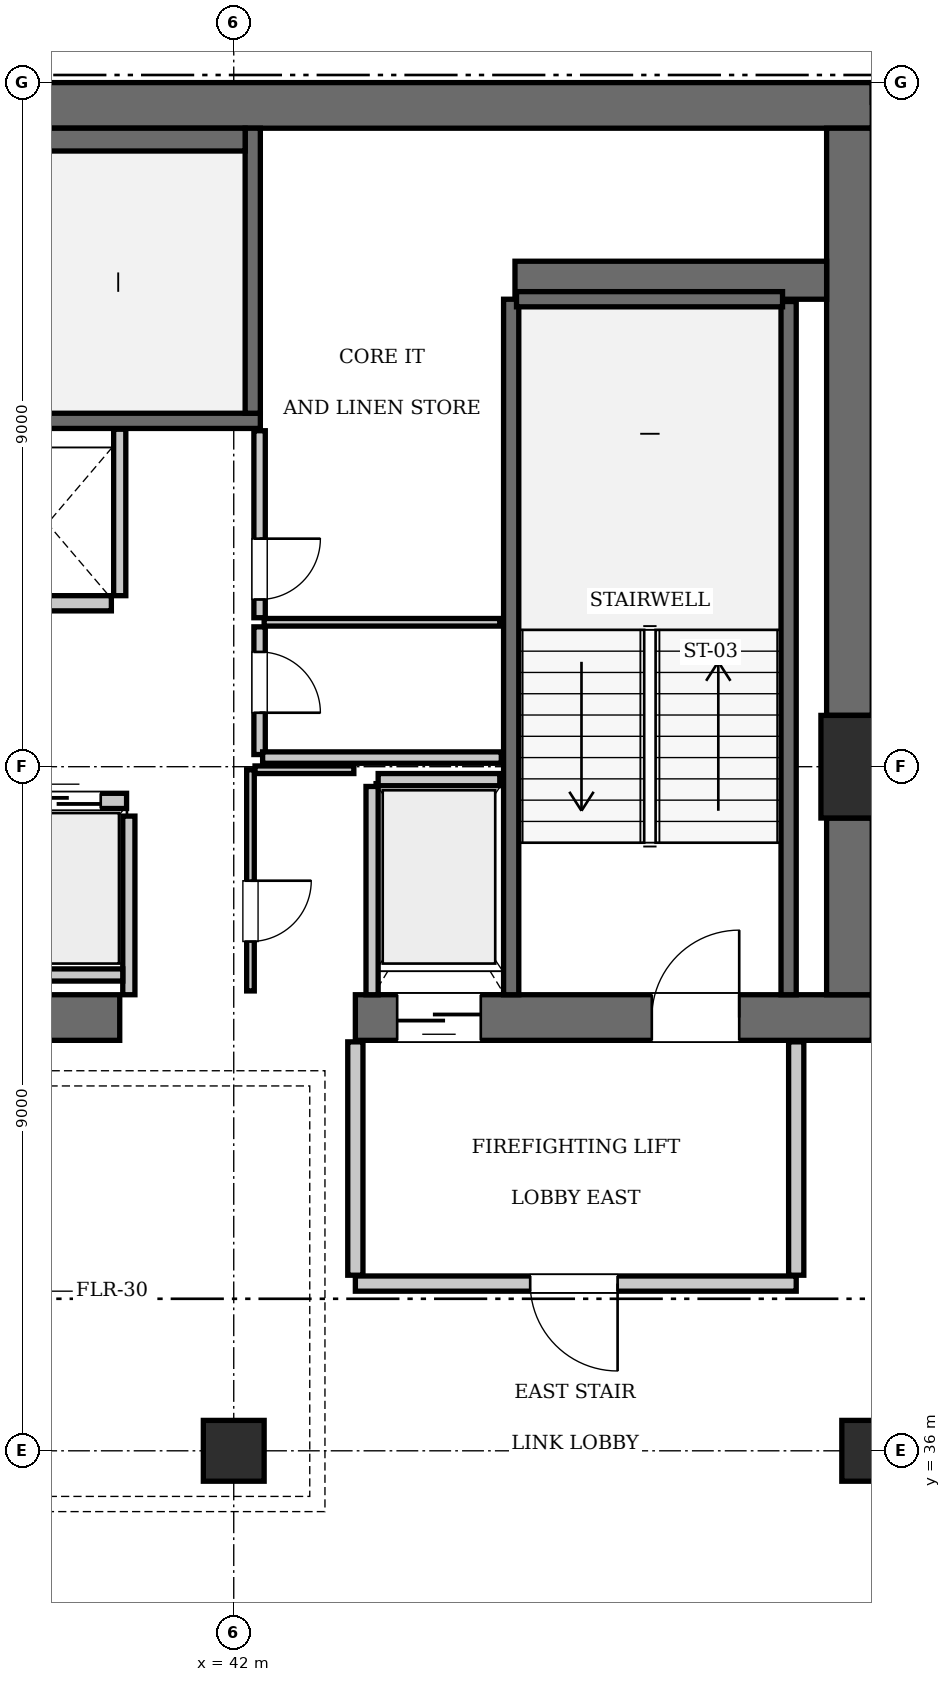
"""IFC4 building model, lengths in metres.
Left out: names, types, materials, properties, quantities, classifications, styles, units other than length and angle.
Written with IfcOpenShell. Run it as: python <this file> out.ifc"""

import sys

from ifc_helpers import new_model, si_unit, direction, frame, frame_2d, origin, origin_2d, place, context, subcontext, project, spatial, rectangle, extrude, element, fill, save


model = new_model("IFC4")
c1 = context("Model", 3, precision=1e-05, world=origin(), true_north=direction((0.0, 1.0)))
c2 = subcontext(c1, "Body", "Model", "MODEL_VIEW")
j1 = project(units=[si_unit("LENGTHUNIT", "METRE"), si_unit("PLANEANGLEUNIT", "RADIAN")], contexts=[c1])
p1 = place(None, origin())
s1 = spatial("IfcSite", under=j1, at=p1, CompositionType="ELEMENT")
p2 = place(p1, origin())
s2 = spatial("IfcBuilding", under=s1, at=p2, CompositionType="ELEMENT")
p3 = place(p2, frame((0.0, 0.0, 322.0)))
s3 = spatial("IfcBuildingStorey", under=s2, at=p3, CompositionType="ELEMENT", Elevation=322.0)
p4 = place(p3, frame((50.4, 45.0, 0.0), z_axis=(0.0, 0.0, 1.0), x_axis=(1.0, 0.0, 0.0)))
e1 = element("IfcColumn", 1, at=p4, inside=s3, PredefinedType="COLUMN", context=c2, shape_type="SweptSolid", body=[
    extrude(rectangle(XDim=1.35, YDim=1.35, at=origin_2d()), origin(), (0.0, 0.0, 1.0), 3.85),
])
p5 = place(p3, frame((25.2, 53.7, 0.0), z_axis=(0.0, 0.0, 1.0), x_axis=(1.0, 0.0, 0.0)))
e2 = element("IfcWall", 2, at=p5, inside=s3, PredefinedType="SHEAR", context=c2, shape_type="SweptSolid", body=[
    extrude(rectangle(XDim=25.2, YDim=0.6, at=frame_2d((12.6, 0.0))), origin(), (0.0, 0.0, 1.0), 3.85),
])
p6 = place(p3, frame((35.1, 41.7, 0.0), z_axis=(0.0, 0.0, 1.0), x_axis=(1.0, 0.0, 0.0)))
e3 = element("IfcWall", 3, at=p6, inside=s3, PredefinedType="SHEAR", context=c2, shape_type="SweptSolid", body=[
    extrude(rectangle(XDim=5.4, YDim=0.6, at=frame_2d((2.7, 0.0))), origin(), (0.0, 0.0, 1.0), 3.85),
])
p7 = place(p3, frame((43.6, 41.7, 0.0), z_axis=(0.0, 0.0, 1.0), x_axis=(1.0, 0.0, 0.0)))
e4 = element("IfcWall", 4, at=p7, inside=s3, PredefinedType="SHEAR", context=c2, shape_type="SweptSolid", body=[
    extrude(rectangle(XDim=6.8, YDim=0.6, at=frame_2d((3.4, 0.0))), origin(), (0.0, 0.0, 1.0), 3.85),
])
p8 = place(p7, frame((3.9, 0.0, 0.0)))
e5 = element("IfcOpeningElement", 5, at=p8, cuts=e4, PredefinedType="OPENING", context=c2, shape_type="SweptSolid", body=[
    extrude(rectangle(XDim=1.15, YDim=2.15, at=frame_2d((0.575, 1.075))), frame((0.0, 0.31, 0.0), z_axis=(0.0, -1.0, 0.0), x_axis=(1.0, 0.0, 0.0)), (0.0, 0.0, 1.0), 0.62),
])
p9 = place(p7, frame((0.55, 0.0, 0.0)))
e6 = element("IfcOpeningElement", 6, at=p9, cuts=e4, PredefinedType="OPENING", context=c2, shape_type="SweptSolid", body=[
    extrude(rectangle(XDim=1.1, YDim=2.2, at=frame_2d((0.55, 1.1))), frame((0.0, 0.31, 0.0), z_axis=(0.0, -1.0, 0.0), x_axis=(1.0, 0.0, 0.0)), (0.0, 0.0, 1.0), 0.62),
])
p10 = place(p3, frame((50.1, 42.0, 0.0), z_axis=(0.0, 0.0, 1.0), x_axis=(0.0, 1.0, 0.0)))
e7 = element("IfcWall", 7, at=p10, inside=s3, PredefinedType="SHEAR", context=c2, shape_type="SweptSolid", body=[
    extrude(rectangle(XDim=2.325, YDim=0.6, at=frame_2d((1.163, 0.0))), origin(), (0.0, 0.0, 1.0), 3.85),
])
p11 = place(p3, frame((50.1, 45.675, 0.0), z_axis=(0.0, 0.0, 1.0), x_axis=(0.0, 1.0, 0.0)))
e8 = element("IfcWall", 8, at=p11, inside=s3, PredefinedType="SHEAR", context=c2, shape_type="SweptSolid", body=[
    extrude(rectangle(XDim=7.725, YDim=0.6, at=frame_2d((3.862, 0.0))), origin(), (0.0, 0.0, 1.0), 3.85),
])
p12 = place(p3, frame((45.7, 51.4, 0.0), z_axis=(0.0, 0.0, 1.0), x_axis=(1.0, 0.0, 0.0)))
e9 = element("IfcWall", 9, at=p12, inside=s3, PredefinedType="SHEAR", context=c2, shape_type="SweptSolid", body=[
    extrude(rectangle(XDim=4.1, YDim=0.5, at=frame_2d((2.05, 0.0))), origin(), (0.0, 0.0, 1.0), 3.85),
])
for number, where, z_axis, x_axis in (
    (10, (42.0, 36.0, 0.0), (0.0, 0.0, 1.0), (1.0, 0.0, 0.0)),
    (11, (50.4, 36.0, 0.0), (0.0, 0.0, 1.0), (1.0, 0.0, 0.0)),
):
    element("IfcColumn", number, at=place(p3, frame(where, z_axis=z_axis, x_axis=x_axis)), inside=s3, PredefinedType="COLUMN", context=c2, shape_type="SweptSolid", body=[
        extrude(rectangle(XDim=0.8, YDim=0.8, at=origin_2d()), origin(), (0.0, 0.0, 1.0), 3.85),
    ])
p13 = place(p3, frame((33.25, 49.55, 0.0), z_axis=(0.0, 0.0, 1.0), x_axis=(1.0, 0.0, 0.0)))
e12 = element("IfcWall", 12, at=p13, inside=s3, PredefinedType="SOLIDWALL", context=c2, shape_type="SweptSolid", body=[
    extrude(rectangle(XDim=9.1, YDim=0.2, at=frame_2d((4.55, 0.0))), origin(), (0.0, 0.0, 1.0), 3.61),
])
p14 = place(p3, frame((42.25, 49.65, 0.0), z_axis=(0.0, 0.0, 1.0), x_axis=(0.0, 1.0, 0.0)))
e13 = element("IfcWall", 13, at=p14, inside=s3, PredefinedType="SOLIDWALL", context=c2, shape_type="SweptSolid", body=[
    extrude(rectangle(XDim=3.75, YDim=0.2, at=frame_2d((1.875, 0.0))), origin(), (0.0, 0.0, 1.0), 3.61),
])
p15 = place(p3, frame((33.45, 53.25, 0.0), z_axis=(0.0, 0.0, 1.0), x_axis=(1.0, 0.0, 0.0)))
e14 = element("IfcWall", 14, at=p15, inside=s3, PredefinedType="SOLIDWALL", context=c2, shape_type="SweptSolid", body=[
    extrude(rectangle(XDim=8.7, YDim=0.3, at=frame_2d((4.35, 0.0))), origin(), (0.0, 0.0, 1.0), 3.61),
])
p16 = place(p3, frame((45.65, 42.0, 0.0), z_axis=(0.0, 0.0, 1.0), x_axis=(0.0, 1.0, 0.0)))
e15 = element("IfcWall", 15, at=p16, inside=s3, PredefinedType="SOLIDWALL", context=c2, shape_type="SweptSolid", body=[
    extrude(rectangle(XDim=9.15, YDim=0.2, at=frame_2d((4.575, 0.0))), origin(), (0.0, 0.0, 1.0), 3.61),
])
p17 = place(p3, frame((49.3, 42.0, 0.0), z_axis=(0.0, 0.0, 1.0), x_axis=(0.0, 1.0, 0.0)))
e16 = element("IfcWall", 16, at=p17, inside=s3, PredefinedType="SOLIDWALL", context=c2, shape_type="SweptSolid", body=[
    extrude(rectangle(XDim=9.12, YDim=0.2, at=frame_2d((4.56, 0.0))), origin(), (0.0, 0.0, 1.0), 3.61),
])
p18 = place(p3, frame((45.72, 51.15, 0.0), z_axis=(0.0, 0.0, 1.0), x_axis=(1.0, 0.0, 0.0)))
e17 = element("IfcWall", 17, at=p18, inside=s3, PredefinedType="SOLIDWALL", context=c2, shape_type="SweptSolid", body=[
    extrude(rectangle(XDim=3.5, YDim=0.2, at=frame_2d((1.75, 0.0))), origin(), (0.0, 0.0, 1.0), 3.61),
])
p19 = place(p3, frame((38.91, 44.55, 0.0), z_axis=(0.0, 0.0, 1.0), x_axis=(1.0, 0.0, 0.0)))
e18 = element("IfcWall", 18, at=p19, inside=s3, PredefinedType="SOLIDWALL", context=c2, shape_type="SweptSolid", body=[
    extrude(rectangle(XDim=1.68, YDim=0.2, at=frame_2d((0.84, 0.0))), origin(), (0.0, 0.0, 1.0), 3.61),
])
p20 = place(p19, frame((0.34, 0.0, 0.0)))
e19 = element("IfcOpeningElement", 19, at=p20, cuts=e18, PredefinedType="OPENING", context=c2, shape_type="SweptSolid", body=[
    extrude(rectangle(XDim=1.0, YDim=2.15, at=frame_2d((0.5, 1.075))), frame((0.0, 0.11, 0.0), z_axis=(0.0, -1.0, 0.0), x_axis=(1.0, 0.0, 0.0)), (0.0, 0.0, 1.0), 0.22),
])
p21 = place(p3, frame((38.71, 47.15, 0.0), z_axis=(0.0, 0.0, 1.0), x_axis=(1.0, 0.0, 0.0)))
e20 = element("IfcWall", 20, at=p21, inside=s3, PredefinedType="SOLIDWALL", context=c2, shape_type="SweptSolid", body=[
    extrude(rectangle(XDim=1.68, YDim=0.2, at=frame_2d((0.84, 0.0))), origin(), (0.0, 0.0, 1.0), 3.61),
])
p22 = place(p3, frame((43.9, 44.83, 0.0), z_axis=(0.0, 0.0, 1.0), x_axis=(1.0, 0.0, 0.0)))
e21 = element("IfcWall", 21, at=p22, inside=s3, PredefinedType="SOLIDWALL", context=c2, shape_type="SweptSolid", body=[
    extrude(rectangle(XDim=1.6, YDim=0.16, at=frame_2d((0.8, 0.0))), origin(), (0.0, 0.0, 1.0), 3.61),
])
p23 = place(p3, frame((43.82, 42.0, 0.0), z_axis=(0.0, 0.0, 1.0), x_axis=(0.0, 1.0, 0.0)))
e22 = element("IfcWall", 22, at=p23, inside=s3, PredefinedType="SOLIDWALL", context=c2, shape_type="SweptSolid", body=[
    extrude(rectangle(XDim=2.74, YDim=0.16, at=frame_2d((1.37, 0.0))), origin(), (0.0, 0.0, 1.0), 3.61),
])
p24 = place(p3, frame((40.62, 42.0, 0.0), z_axis=(0.0, 0.0, 1.0), x_axis=(0.0, 1.0, 0.0)))
e23 = element("IfcWall", 23, at=p24, inside=s3, PredefinedType="SOLIDWALL", context=c2, shape_type="SweptSolid", body=[
    extrude(rectangle(XDim=2.35, YDim=0.16, at=frame_2d((1.175, 0.0))), origin(), (0.0, 0.0, 1.0), 3.61),
])
p25 = place(p3, frame((35.52, 42.26, 0.0), z_axis=(0.0, 0.0, 1.0), x_axis=(1.0, 0.0, 0.0)))
e24 = element("IfcWall", 24, at=p25, inside=s3, PredefinedType="SOLIDWALL", context=c2, shape_type="SweptSolid", body=[
    extrude(rectangle(XDim=5.02, YDim=0.16, at=frame_2d((2.51, 0.0))), origin(), (0.0, 0.0, 1.0), 3.61),
])
p26 = place(p3, frame((40.5, 47.25, 0.0), z_axis=(0.0, 0.0, 1.0), x_axis=(0.0, 1.0, 0.0)))
e25 = element("IfcWall", 25, at=p26, inside=s3, PredefinedType="SOLIDWALL", context=c2, shape_type="SweptSolid", body=[
    extrude(rectangle(XDim=2.19, YDim=0.16, at=frame_2d((1.095, 0.0))), origin(), (0.0, 0.0, 1.0), 3.61),
])
p27 = place(p3, frame((43.6, 38.2, 0.0), z_axis=(0.0, 0.0, 1.0), x_axis=(1.0, 0.0, 0.0)))
e26 = element("IfcWall", 26, at=p27, inside=s3, PredefinedType="PARTITIONING", context=c2, shape_type="SweptSolid", body=[
    extrude(rectangle(XDim=5.8, YDim=0.2, at=frame_2d((2.9, 0.0))), origin(), (0.0, 0.0, 1.0), 3.61),
])
p28 = place(p27, frame((2.3, 0.0, 0.0)))
e27 = element("IfcOpeningElement", 27, at=p28, cuts=e26, PredefinedType="OPENING", context=c2, shape_type="SweptSolid", body=[
    extrude(rectangle(XDim=1.15, YDim=2.15, at=frame_2d((0.575, 1.075))), frame((0.0, 0.11, 0.0), z_axis=(0.0, -1.0, 0.0), x_axis=(1.0, 0.0, 0.0)), (0.0, 0.0, 1.0), 0.22),
])
for number, where, z_axis, x_axis in (
    (28, (43.6, 38.31, 0.0), (0.0, 0.0, 1.0), (0.0, 1.0, 0.0)),
    (29, (49.4, 38.31, 0.0), (0.0, 0.0, 1.0), (0.0, 1.0, 0.0)),
):
    element("IfcWall", number, at=place(p3, frame(where, z_axis=z_axis, x_axis=x_axis)), inside=s3, PredefinedType="PARTITIONING", context=c2, shape_type="SweptSolid", body=[
        extrude(rectangle(XDim=3.07, YDim=0.2, at=frame_2d((1.535, 0.0))), origin(), (0.0, 0.0, 1.0), 3.61),
    ])
p29 = place(p3, frame((42.22, 42.05, 0.0), z_axis=(0.0, 0.0, 1.0), x_axis=(0.0, 1.0, 0.0)))
e30 = element("IfcWall", 30, at=p29, inside=s3, PredefinedType="PARTITIONING", context=c2, shape_type="SweptSolid", body=[
    extrude(rectangle(XDim=2.91, YDim=0.1, at=frame_2d((1.455, 0.0))), origin(), (0.0, 0.0, 1.0), 3.61),
])
p30 = place(p29, frame((0.65, 0.0, 0.0)))
e31 = element("IfcOpeningElement", 31, at=p30, cuts=e30, PredefinedType="OPENING", context=c2, shape_type="SweptSolid", body=[
    extrude(rectangle(XDim=0.8, YDim=2.05, at=frame_2d((0.4, 1.025))), frame((0.0, 0.06, 0.0), z_axis=(0.0, -1.0, 0.0), x_axis=(1.0, 0.0, 0.0)), (0.0, 0.0, 1.0), 0.12),
])
p31 = place(p3, frame((42.28, 44.96, 0.0), z_axis=(0.0, 0.0, 1.0), x_axis=(1.0, 0.0, 0.0)))
e32 = element("IfcWall", 32, at=p31, inside=s3, PredefinedType="PARTITIONING", context=c2, shape_type="SweptSolid", body=[
    extrude(rectangle(XDim=1.3, YDim=0.1, at=frame_2d((0.65, 0.0))), origin(), (0.0, 0.0, 1.0), 3.61),
])
p32 = place(p3, frame((42.34, 45.16, 0.0), z_axis=(0.0, 0.0, 1.0), x_axis=(0.0, 1.0, 0.0)))
e33 = element("IfcWall", 33, at=p32, inside=s3, PredefinedType="PARTITIONING", context=c2, shape_type="SweptSolid", body=[
    extrude(rectangle(XDim=1.68, YDim=0.15, at=frame_2d((0.84, 0.0))), origin(), (0.0, 0.0, 1.0), 3.61),
])
p33 = place(p32, frame((0.55, 0.0, 0.0)))
e34 = element("IfcOpeningElement", 34, at=p33, cuts=e33, PredefinedType="OPENING", context=c2, shape_type="SweptSolid", body=[
    extrude(rectangle(XDim=0.8, YDim=2.05, at=frame_2d((0.4, 1.025))), frame((0.0, 0.085, 0.0), z_axis=(0.0, -1.0, 0.0), x_axis=(1.0, 0.0, 0.0)), (0.0, 0.0, 1.0), 0.17),
])
p34 = place(p3, frame((42.34, 46.96, 0.0), z_axis=(0.0, 0.0, 1.0), x_axis=(0.0, 1.0, 0.0)))
e35 = element("IfcWall", 35, at=p34, inside=s3, PredefinedType="PARTITIONING", context=c2, shape_type="SweptSolid", body=[
    extrude(rectangle(XDim=2.46, YDim=0.15, at=frame_2d((1.23, 0.0))), origin(), (0.0, 0.0, 1.0), 3.61),
])
p35 = place(p34, frame((0.24, 0.0, 0.0)))
e36 = element("IfcOpeningElement", 36, at=p35, cuts=e35, PredefinedType="OPENING", context=c2, shape_type="SweptSolid", body=[
    extrude(rectangle(XDim=0.8, YDim=2.05, at=frame_2d((0.4, 1.025))), frame((0.0, 0.085, 0.0), z_axis=(0.0, -1.0, 0.0), x_axis=(1.0, 0.0, 0.0)), (0.0, 0.0, 1.0), 0.17),
])
p36 = place(p3, frame((42.4, 46.9, 0.0), z_axis=(0.0, 0.0, 1.0), x_axis=(1.0, 0.0, 0.0)))
e37 = element("IfcWall", 37, at=p36, inside=s3, PredefinedType="PARTITIONING", context=c2, shape_type="SweptSolid", body=[
    extrude(rectangle(XDim=3.1, YDim=0.1, at=frame_2d((1.55, 0.0))), origin(), (0.0, 0.0, 1.0), 3.61),
])
p37 = place(p3, frame((42.38, 45.12, 0.0), z_axis=(0.0, 0.0, 1.0), x_axis=(1.0, 0.0, 0.0)))
e38 = element("IfcWall", 38, at=p37, inside=s3, PredefinedType="PARTITIONING", context=c2, shape_type="SweptSolid", body=[
    extrude(rectangle(XDim=3.14, YDim=0.15, at=frame_2d((1.57, 0.0))), origin(), (0.0, 0.0, 1.0), 3.61),
])
p38 = place(p8, origin())
e39 = element("IfcDoor", 39, at=p38, inside=s3, OperationType="SINGLE_SWING_RIGHT", PredefinedType="DOOR", context=c2, shape_type="SweptSolid", body=[
    extrude(rectangle(XDim=1.15, YDim=2.15, at=frame_2d((0.575, 1.075))), frame((0.0, 0.025, 0.0), z_axis=(0.0, -1.0, 0.0), x_axis=(1.0, 0.0, 0.0)), (0.0, 0.0, 1.0), 0.05),
])
fill(e5, e39)
p39 = place(p20, origin())
e40 = element("IfcDoor", 40, at=p39, inside=s3, OperationType="SLIDING_TO_LEFT", PredefinedType="DOOR", context=c2, shape_type="SweptSolid", body=[
    extrude(rectangle(XDim=1.0, YDim=2.15, at=frame_2d((0.5, 1.075))), frame((0.0, 0.025, 0.0), z_axis=(0.0, -1.0, 0.0), x_axis=(1.0, 0.0, 0.0)), (0.0, 0.0, 1.0), 0.05),
])
fill(e19, e40)
p40 = place(p9, frame((1.1, 0.0, 0.0), z_axis=(0.0, 0.0, 1.0), x_axis=(-1.0, 0.0, 0.0)))
e41 = element("IfcDoor", 41, at=p40, inside=s3, OperationType="SLIDING_TO_LEFT", PredefinedType="DOOR", context=c2, shape_type="SweptSolid", body=[
    extrude(rectangle(XDim=1.1, YDim=2.2, at=frame_2d((0.55, 1.1))), frame((0.0, 0.025, 0.0), z_axis=(0.0, -1.0, 0.0), x_axis=(1.0, 0.0, 0.0)), (0.0, 0.0, 1.0), 0.05),
])
fill(e6, e41)
p41 = place(p28, frame((1.15, 0.0, 0.0), z_axis=(0.0, 0.0, 1.0), x_axis=(-1.0, 0.0, 0.0)))
e42 = element("IfcDoor", 42, at=p41, inside=s3, OperationType="SINGLE_SWING_LEFT", PredefinedType="DOOR", context=c2, shape_type="SweptSolid", body=[
    extrude(rectangle(XDim=1.15, YDim=2.15, at=frame_2d((0.575, 1.075))), frame((0.0, 0.025, 0.0), z_axis=(0.0, -1.0, 0.0), x_axis=(1.0, 0.0, 0.0)), (0.0, 0.0, 1.0), 0.05),
])
fill(e27, e42)
p42 = place(p30, frame((0.8, 0.0, 0.0), z_axis=(0.0, 0.0, 1.0), x_axis=(-1.0, 0.0, 0.0)))
e43 = element("IfcDoor", 43, at=p42, inside=s3, OperationType="SINGLE_SWING_LEFT", PredefinedType="DOOR", context=c2, shape_type="SweptSolid", body=[
    extrude(rectangle(XDim=0.8, YDim=2.05, at=frame_2d((0.4, 1.025))), frame((0.0, 0.025, 0.0), z_axis=(0.0, -1.0, 0.0), x_axis=(1.0, 0.0, 0.0)), (0.0, 0.0, 1.0), 0.05),
])
fill(e31, e43)
p43 = place(p33, frame((0.8, 0.0, 0.0), z_axis=(0.0, 0.0, 1.0), x_axis=(-1.0, 0.0, 0.0)))
e44 = element("IfcDoor", 44, at=p43, inside=s3, OperationType="SINGLE_SWING_RIGHT", PredefinedType="DOOR", context=c2, shape_type="SweptSolid", body=[
    extrude(rectangle(XDim=0.8, YDim=2.05, at=frame_2d((0.4, 1.025))), frame((0.0, 0.025, 0.0), z_axis=(0.0, -1.0, 0.0), x_axis=(1.0, 0.0, 0.0)), (0.0, 0.0, 1.0), 0.05),
])
fill(e34, e44)
p44 = place(p35, frame((0.8, 0.0, 0.0), z_axis=(0.0, 0.0, 1.0), x_axis=(-1.0, 0.0, 0.0)))
e45 = element("IfcDoor", 45, at=p44, inside=s3, OperationType="SINGLE_SWING_LEFT", PredefinedType="DOOR", context=c2, shape_type="SweptSolid", body=[
    extrude(rectangle(XDim=0.8, YDim=2.05, at=frame_2d((0.4, 1.025))), frame((0.0, 0.025, 0.0), z_axis=(0.0, -1.0, 0.0), x_axis=(1.0, 0.0, 0.0)), (0.0, 0.0, 1.0), 0.05),
])
fill(e36, e45)
save(model, sys.argv[1])
